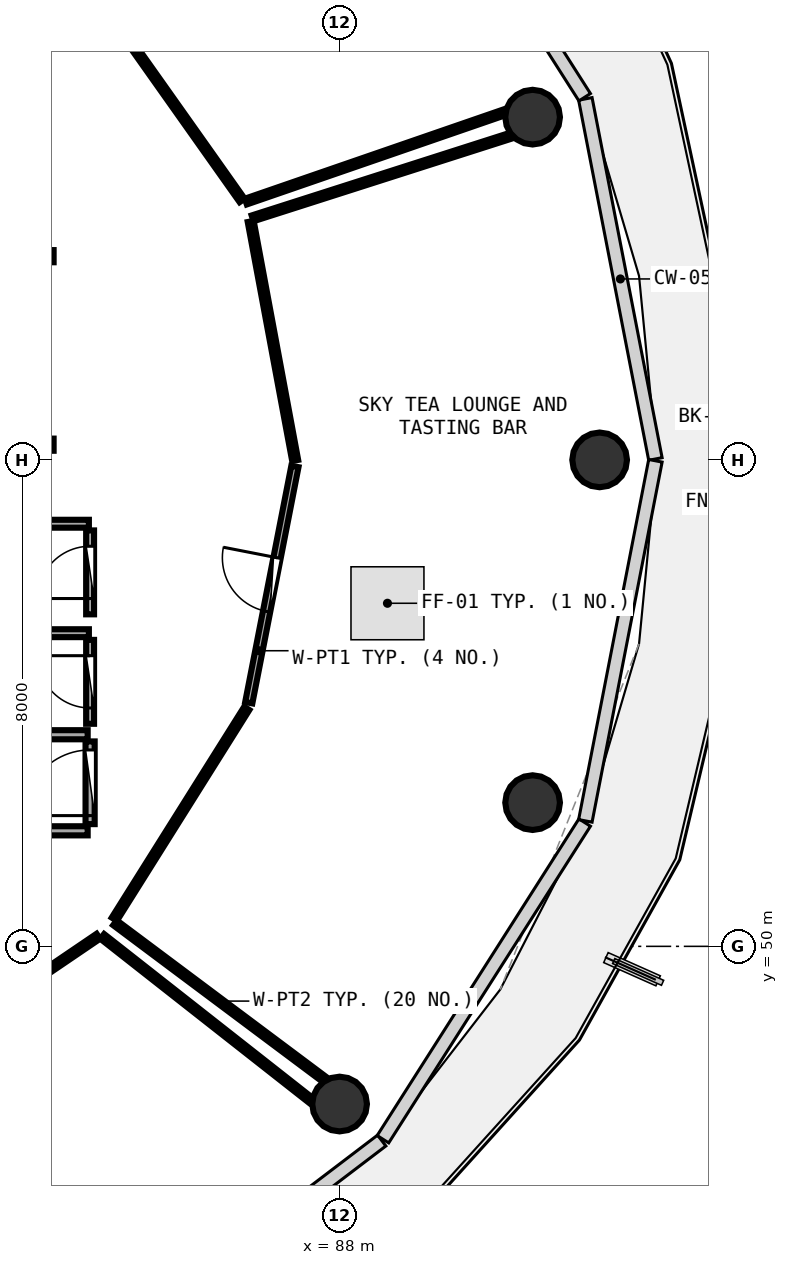
"""IFC4 building model, lengths in metres.
Left out: names, types, materials, properties, quantities, classifications, styles, units other than length and angle.
Written with IfcOpenShell. Run it as: python <this file> out.ifc"""

import sys

from ifc_helpers import new_model, si_unit, direction, frame, frame_2d, origin, origin_2d, place, context, subcontext, project, spatial, rectangle, circle, extrude, element, fill, save


model = new_model("IFC4")
c1 = context("Model", 3, precision=1e-05, world=origin(), true_north=direction((0.0, 1.0)))
c2 = subcontext(c1, "Body", "Model", "MODEL_VIEW")
j1 = project(units=[si_unit("LENGTHUNIT", "METRE"), si_unit("PLANEANGLEUNIT", "RADIAN")], contexts=[c1])
p1 = place(None, origin())
s1 = spatial("IfcSite", under=j1, at=p1, CompositionType="ELEMENT")
p2 = place(p1, origin())
s2 = spatial("IfcBuilding", under=s1, at=p2, CompositionType="ELEMENT")
p3 = place(p2, frame((0.0, 0.0, 293.7)))
s3 = spatial("IfcBuildingStorey", under=s2, at=p3, CompositionType="ELEMENT", Elevation=293.7)
for number, where, z_axis, x_axis in (
    (1, (92.28, 58.0, 0.0), (0.0, 0.0, 1.0), (1.0, 0.0, 0.0)),
    (2, (91.177, 63.636, 0.0), (0.0, 0.0, 1.0), (1.0, 0.0, 0.0)),
    (3, (88.003, 47.407, 0.0), (0.0, 0.0, 1.0), (1.0, 0.0, 0.0)),
    (4, (91.177, 52.364, 0.0), (0.0, 0.0, 1.0), (1.0, 0.0, 0.0)),
):
    element("IfcColumn", number, at=place(p3, frame(where, z_axis=z_axis, x_axis=x_axis)), inside=s3, PredefinedType="COLUMN", context=c2, shape_type="SweptSolid", body=[
        extrude(circle(Radius=0.45, at=origin_2d()), origin(), (0.0, 0.0, 1.0), 4.8),
    ])
p4 = place(p3, frame((79.3, 61.35, 0.0), z_axis=(0.0, 0.0, 1.0), x_axis=(1.0, 0.0, 0.0)))
e5 = element("IfcWall", 5, at=p4, inside=s3, PredefinedType="SOLIDWALL", context=c2, shape_type="SweptSolid", body=[
    extrude(rectangle(XDim=4.0, YDim=0.2, at=frame_2d((2.0, 0.0))), origin(), (0.0, 0.0, 1.0), 3.825),
])
p5 = place(p4, frame((0.45, 0.0, 0.0)))
e6 = element("IfcOpeningElement", 6, at=p5, cuts=e5, PredefinedType="OPENING", context=c2, shape_type="SweptSolid", body=[
    extrude(rectangle(XDim=1.2, YDim=2.15, at=frame_2d((0.6, 1.075))), frame((0.0, 0.11, 0.0), z_axis=(0.0, -1.0, 0.0), x_axis=(1.0, 0.0, 0.0)), (0.0, 0.0, 1.0), 0.22),
])
p6 = place(p3, frame((79.3, 58.25, 0.0), z_axis=(0.0, 0.0, 1.0), x_axis=(1.0, 0.0, 0.0)))
e7 = element("IfcWall", 7, at=p6, inside=s3, PredefinedType="SOLIDWALL", context=c2, shape_type="SweptSolid", body=[
    extrude(rectangle(XDim=4.0, YDim=0.2, at=frame_2d((2.0, 0.0))), origin(), (0.0, 0.0, 1.0), 2.525),
])
p7 = place(p6, frame((0.5, 0.0, 0.0)))
e8 = element("IfcOpeningElement", 8, at=p7, cuts=e7, PredefinedType="OPENING", context=c2, shape_type="SweptSolid", body=[
    extrude(rectangle(XDim=1.1, YDim=2.1, at=frame_2d((0.55, 1.05))), frame((0.0, 0.11, 0.0), z_axis=(0.0, -1.0, 0.0), x_axis=(1.0, 0.0, 0.0)), (0.0, 0.0, 1.0), 0.22),
])
p8 = place(p3, frame((86.51, 54.007, 0.0), z_axis=(0.0, 0.0, 1.0), x_axis=(0.191737851033, 0.981446176049, 0.0)))
e9 = element("IfcWall", 9, at=p8, inside=s3, PredefinedType="PARTITIONING", context=c2, shape_type="SweptSolid", body=[
    extrude(rectangle(XDim=3.959, YDim=0.12, at=frame_2d((1.979, 0.0))), origin(), (0.0, 0.0, 1.0), 2.525),
])
p9 = place(p8, frame((1.529, 0.0, 0.0)))
e10 = element("IfcOpeningElement", 10, at=p9, cuts=e9, PredefinedType="OPENING", context=c2, shape_type="SweptSolid", body=[
    extrude(rectangle(XDim=0.9, YDim=2.08, at=frame_2d((0.45, 1.04))), frame((0.0, 0.07, 0.0), z_axis=(0.0, -1.0, 0.0), x_axis=(1.0, 0.0, 0.0)), (0.0, 0.0, 1.0), 0.14),
])
p10 = place(p3, frame((83.9, 52.01, 0.0), z_axis=(0.0, 0.0, 1.0), x_axis=(0.0, 1.0, 0.0)))
e11 = element("IfcWall", 11, at=p10, inside=s3, PredefinedType="PARTITIONING", context=c2, shape_type="SweptSolid", body=[
    extrude(rectangle(XDim=1.36, YDim=0.15, at=frame_2d((0.68, 0.0))), origin(), (0.0, 0.0, 1.0), 2.525),
])
p11 = place(p10, frame((0.14, 0.0, 0.0)))
e12 = element("IfcOpeningElement", 12, at=p11, cuts=e11, PredefinedType="OPENING", context=c2, shape_type="SweptSolid", body=[
    extrude(rectangle(XDim=1.08, YDim=2.1, at=frame_2d((0.54, 1.05))), frame((0.0, 0.085, 0.0), z_axis=(0.0, -1.0, 0.0), x_axis=(1.0, 0.0, 0.0)), (0.0, 0.0, 1.0), 0.17),
])
p12 = place(p3, frame((83.9, 53.66, 0.0), z_axis=(0.0, 0.0, 1.0), x_axis=(0.0, 1.0, 0.0)))
e13 = element("IfcWall", 13, at=p12, inside=s3, PredefinedType="PLUMBINGWALL", context=c2, shape_type="SweptSolid", body=[
    extrude(rectangle(XDim=1.38, YDim=0.13, at=frame_2d((0.69, 0.0))), origin(), (0.0, 0.0, 1.0), 4.53),
])
p13 = place(p12, frame((0.26, 0.0, 0.0)))
e14 = element("IfcOpeningElement", 14, at=p13, cuts=e13, PredefinedType="OPENING", context=c2, shape_type="SweptSolid", body=[
    extrude(rectangle(XDim=0.86, YDim=2.05, at=frame_2d((0.43, 1.025))), frame((0.0, 0.075, 0.0), z_axis=(0.0, -1.0, 0.0), x_axis=(1.0, 0.0, 0.0)), (0.0, 0.0, 1.0), 0.15),
])
p14 = place(p3, frame((83.9, 55.46, 0.0), z_axis=(0.0, 0.0, 1.0), x_axis=(0.0, 1.0, 0.0)))
e15 = element("IfcWall", 15, at=p14, inside=s3, PredefinedType="PLUMBINGWALL", context=c2, shape_type="SweptSolid", body=[
    extrude(rectangle(XDim=1.38, YDim=0.13, at=frame_2d((0.69, 0.0))), origin(), (0.0, 0.0, 1.0), 4.53),
])
p15 = place(p14, frame((0.26, 0.0, 0.0)))
e16 = element("IfcOpeningElement", 16, at=p15, cuts=e15, PredefinedType="OPENING", context=c2, shape_type="SweptSolid", body=[
    extrude(rectangle(XDim=0.86, YDim=2.05, at=frame_2d((0.43, 1.025))), frame((0.0, 0.075, 0.0), z_axis=(0.0, -1.0, 0.0), x_axis=(1.0, 0.0, 0.0)), (0.0, 0.0, 1.0), 0.15),
])
p16 = place(p3, frame((86.4, 62.268, 0.0), z_axis=(0.0, 0.0, 1.0), x_axis=(-0.577818362239, 0.81616538781, 0.0)))
e17 = element("IfcWall", 17, at=p16, inside=s3, PredefinedType="PARTITIONING", context=c2, shape_type="SweptSolid", body=[
    extrude(rectangle(XDim=5.005, YDim=0.1, at=frame_2d((2.502, 0.0))), origin(), (0.0, 0.0, 1.0), 2.525),
])
p17 = place(p3, frame((90.709, 63.714, 0.0), z_axis=(0.0, 0.0, 1.0), x_axis=(-0.945295018754, -0.326216687984, 0.0)))
e18 = element("IfcWall", 18, at=p17, inside=s3, PredefinedType="PARTITIONING", context=c2, shape_type="SweptSolid", body=[
    extrude(rectangle(XDim=4.494, YDim=0.1, at=frame_2d((2.247, 0.0))), origin(), (0.0, 0.0, 1.0), 2.525),
])
p18 = place(p3, frame((79.572, 47.135, 0.0), z_axis=(0.0, 0.0, 1.0), x_axis=(0.82725042388, 0.561833370485, 0.0)))
e19 = element("IfcWall", 19, at=p18, inside=s3, PredefinedType="PARTITIONING", context=c2, shape_type="SweptSolid", body=[
    extrude(rectangle(XDim=5.395, YDim=0.1, at=frame_2d((2.697, 0.0))), origin(), (0.0, 0.0, 1.0), 2.525),
])
p19 = place(p3, frame((84.1, 50.163, 0.0), z_axis=(0.0, 0.0, 1.0), x_axis=(0.786300871832, -0.617843782, 0.0)))
e20 = element("IfcWall", 20, at=p19, inside=s3, PredefinedType="PARTITIONING", context=c2, shape_type="SweptSolid", body=[
    extrude(rectangle(XDim=4.365, YDim=0.1, at=frame_2d((2.183, 0.0))), origin(), (0.0, 0.0, 1.0), 2.525),
])
p20 = place(p3, frame((84.298, 50.446, 0.0), z_axis=(0.0, 0.0, 1.0), x_axis=(0.531894397673, 0.846810692967, 0.0)))
e21 = element("IfcWall", 21, at=p20, inside=s3, PredefinedType="PARTITIONING", context=c2, shape_type="SweptSolid", body=[
    extrude(rectangle(XDim=4.096, YDim=0.1, at=frame_2d((2.048, 0.0))), origin(), (0.0, 0.0, 1.0), 2.525),
])
p21 = place(p3, frame((87.273, 57.99, 0.0), z_axis=(0.0, 0.0, 1.0), x_axis=(-0.182957331543, 0.983120854643, 0.0)))
e22 = element("IfcWall", 22, at=p21, inside=s3, PredefinedType="PARTITIONING", context=c2, shape_type="SweptSolid", body=[
    extrude(rectangle(XDim=3.998, YDim=0.1, at=frame_2d((1.999, 0.0))), origin(), (0.0, 0.0, 1.0), 2.525),
])
p22 = place(p3, frame((86.572, 61.972, 0.0), z_axis=(0.0, 0.0, 1.0), x_axis=(0.952449595941, 0.304696188345, 0.0)))
e23 = element("IfcWall", 23, at=p22, inside=s3, PredefinedType="PARTITIONING", context=c2, shape_type="SweptSolid", body=[
    extrude(rectangle(XDim=4.455, YDim=0.1, at=frame_2d((2.228, 0.0))), origin(), (0.0, 0.0, 1.0), 2.525),
])
p23 = place(p3, frame((87.755, 47.812, 0.0), z_axis=(0.0, 0.0, 1.0), x_axis=(-0.800863986332, 0.598846286952, 0.0)))
e24 = element("IfcWall", 24, at=p23, inside=s3, PredefinedType="PARTITIONING", context=c2, shape_type="SweptSolid", body=[
    extrude(rectangle(XDim=4.302, YDim=0.1, at=frame_2d((2.151, 0.0))), origin(), (0.0, 0.0, 1.0), 2.525),
])
p24 = place(p3, frame((82.22, 51.9, 0.0), z_axis=(0.0, 0.0, 1.0), x_axis=(1.0, 0.0, 0.0)))
e25 = element("IfcWall", 25, at=p24, inside=s3, PredefinedType="PARTITIONING", context=c2, shape_type="SweptSolid", body=[
    extrude(rectangle(XDim=1.64, YDim=0.15, at=frame_2d((0.82, 0.0))), origin(), (0.0, 0.0, 1.0), 2.525),
])
p25 = place(p3, frame((83.86, 53.48, 0.0), z_axis=(0.0, 0.0, 1.0), x_axis=(-1.0, 0.0, 0.0)))
e26 = element("IfcWall", 26, at=p25, inside=s3, PredefinedType="PARTITIONING", context=c2, shape_type="SweptSolid", body=[
    extrude(rectangle(XDim=1.64, YDim=0.15, at=frame_2d((0.82, 0.0))), origin(), (0.0, 0.0, 1.0), 3.825),
])
for number, where, z_axis, x_axis in (
    (27, (83.88, 55.15, 0.0), (0.0, 0.0, 1.0), (-1.0, 0.0, 0.0)),
    (28, (83.88, 56.95, 0.0), (0.0, 0.0, 1.0), (-1.0, 0.0, 0.0)),
):
    element("IfcWall", number, at=place(p3, frame(where, z_axis=z_axis, x_axis=x_axis)), inside=s3, PredefinedType="PLUMBINGWALL", context=c2, shape_type="SweptSolid", body=[
        extrude(rectangle(XDim=1.74, YDim=0.13, at=frame_2d((0.87, 0.0))), origin(), (0.0, 0.0, 1.0), 3.825),
    ])
p26 = place(p9, origin())
e29 = element("IfcDoor", 29, at=p26, inside=s3, OperationType="SINGLE_SWING_RIGHT", PredefinedType="DOOR", context=c2, shape_type="SweptSolid", body=[
    extrude(rectangle(XDim=0.9, YDim=2.08, at=frame_2d((0.45, 1.04))), frame((0.0, 0.025, 0.0), z_axis=(0.0, -1.0, 0.0), x_axis=(1.0, 0.0, 0.0)), (0.0, 0.0, 1.0), 0.05),
])
fill(e10, e29)
p27 = place(p11, origin())
e30 = element("IfcDoor", 30, at=p27, inside=s3, OperationType="SINGLE_SWING_LEFT", PredefinedType="DOOR", context=c2, shape_type="SweptSolid", body=[
    extrude(rectangle(XDim=1.08, YDim=2.1, at=frame_2d((0.54, 1.05))), frame((0.0, 0.025, 0.0), z_axis=(0.0, -1.0, 0.0), x_axis=(1.0, 0.0, 0.0)), (0.0, 0.0, 1.0), 0.05),
])
fill(e12, e30)
p28 = place(p13, origin())
e31 = element("IfcDoor", 31, at=p28, inside=s3, OperationType="SINGLE_SWING_RIGHT", PredefinedType="DOOR", context=c2, shape_type="SweptSolid", body=[
    extrude(rectangle(XDim=0.86, YDim=2.05, at=frame_2d((0.43, 1.025))), frame((0.0, 0.025, 0.0), z_axis=(0.0, -1.0, 0.0), x_axis=(1.0, 0.0, 0.0)), (0.0, 0.0, 1.0), 0.05),
])
fill(e14, e31)
p29 = place(p15, origin())
e32 = element("IfcDoor", 32, at=p29, inside=s3, OperationType="SINGLE_SWING_LEFT", PredefinedType="DOOR", context=c2, shape_type="SweptSolid", body=[
    extrude(rectangle(XDim=0.86, YDim=2.05, at=frame_2d((0.43, 1.025))), frame((0.0, 0.025, 0.0), z_axis=(0.0, -1.0, 0.0), x_axis=(1.0, 0.0, 0.0)), (0.0, 0.0, 1.0), 0.05),
])
fill(e16, e32)
save(model, sys.argv[1])
